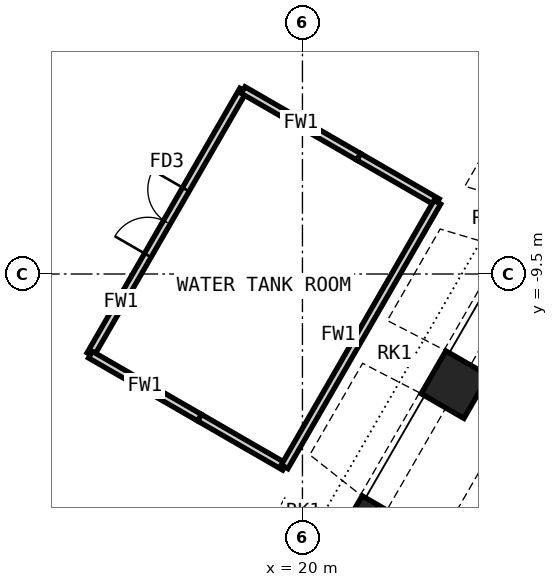
"""IFC4 building model, lengths in metres.
Left out: names, types, materials, properties, quantities, classifications, styles, units other than length and angle.
Written with IfcOpenShell. Run it as: python <this file> out.ifc"""

import sys

from ifc_helpers import new_model, si_unit, direction, frame, frame_2d, origin, origin_2d, place, context, subcontext, project, spatial, rectangle, hollow_rectangle, extrude, clip, halfspace, element, fill, save


model = new_model("IFC4")
c1 = context("Model", 3, precision=1e-05, world=origin(), true_north=direction((0.0, 1.0)))
c2 = subcontext(c1, "Body", "Model", "MODEL_VIEW")
j1 = project(units=[si_unit("LENGTHUNIT", "METRE"), si_unit("PLANEANGLEUNIT", "RADIAN")], contexts=[c1])
p1 = place(None, origin())
s1 = spatial("IfcSite", under=j1, at=p1, CompositionType="ELEMENT")
p2 = place(p1, origin())
s2 = spatial("IfcBuilding", under=s1, at=p2, CompositionType="ELEMENT")
p3 = place(p2, frame((0.0, 0.0, 97.0)))
s3 = spatial("IfcBuildingStorey", under=s2, at=p3, CompositionType="ELEMENT", Elevation=97.0)
p4 = place(p3, frame((26.214, -8.596, 0.0), z_axis=(-0.310821675411, 0.092303452339, 0.945975665005), x_axis=(0.643002166591, -0.712531180262, 0.280798025126)))
e1 = element("IfcColumn", 1, at=p4, inside=s3, PredefinedType="COLUMN", context=c2, shape_type="Clipping", body=[
    clip(clip(extrude(hollow_rectangle(XDim=1.3, YDim=1.3, WallThickness=0.1, at=origin_2d()), origin(), (0.0, 0.0, 1.0), 6.343), halfspace(frame((0.0, 0.0, 0.243), z_axis=(0.0, 0.0, -1.0), x_axis=(0.0, -1.0, 0.0)), False)), halfspace(frame((0.0, 0.0, 6.1), z_axis=(0.0, 0.0, 1.0), x_axis=(0.0, 1.0, 0.0)), False)),
])
p5 = place(p3, frame((24.011, -12.411, 0.0), z_axis=(-0.281185331584, 0.145359500171, 0.948580742484), x_axis=(0.500142058004, -0.821408540602, 0.27412758205)))
e2 = element("IfcColumn", 2, at=p5, inside=s3, PredefinedType="COLUMN", context=c2, shape_type="Clipping", body=[
    clip(clip(extrude(hollow_rectangle(XDim=1.3, YDim=1.3, WallThickness=0.1, at=origin_2d()), origin(), (0.0, 0.0, 1.0), 6.325), halfspace(frame((0.0, 0.0, 0.211), z_axis=(0.0, 0.0, -1.0), x_axis=(0.0, -1.0, 0.0)), False)), halfspace(frame((0.0, 0.0, 6.114), z_axis=(0.0, 0.0, 1.0), x_axis=(0.0, 1.0, 0.0)), False)),
])
p6 = place(p3, frame((21.809, -16.225, 0.0), z_axis=(-0.250490721891, 0.19793240078, 0.947669332081), x_axis=(0.33394448632, -0.901132039316, 0.276481695188)))
e3 = element("IfcColumn", 3, at=p6, inside=s3, PredefinedType="COLUMN", context=c2, shape_type="Clipping", body=[
    clip(clip(extrude(hollow_rectangle(XDim=1.3, YDim=1.3, WallThickness=0.1, at=origin_2d()), origin(), (0.0, 0.0, 1.0), 6.331), halfspace(frame((0.0, 0.0, 0.218), z_axis=(0.0, 0.0, -1.0), x_axis=(0.0, -1.0, 0.0)), False)), halfspace(frame((0.0, 0.0, 6.114), z_axis=(0.0, 0.0, 1.0), x_axis=(0.0, 1.0, 0.0)), False)),
])
p7 = place(p3, frame((23.55, -7.611, 0.0), z_axis=(0.0, 0.0, 1.0), x_axis=(-0.866029160995, 0.499993492265, 0.0)))
e4 = element("IfcWall", 4, at=p7, inside=s3, PredefinedType="PARTITIONING", context=c2, shape_type="SweptSolid", body=[
    extrude(rectangle(XDim=2.391, YDim=0.2, at=frame_2d((1.196, 0.0))), origin(), (0.0, 0.0, 1.0), 4.73),
])
p8 = place(p3, frame((19.531, -14.572, 0.0), z_axis=(0.0, 0.0, 1.0), x_axis=(-0.866033117094, 0.499986639918, 0.0)))
e5 = element("IfcWall", 5, at=p8, inside=s3, PredefinedType="PARTITIONING", context=c2, shape_type="SweptSolid", body=[
    extrude(rectangle(XDim=2.586, YDim=0.2, at=frame_2d((1.293, 0.0))), origin(), (0.0, 0.0, 1.0), 4.93),
])
p9 = place(p3, frame((18.44, -4.661, 0.0), z_axis=(0.0, 0.0, 1.0), x_axis=(-0.500000268222, -0.866025248926, 0.0)))
e6 = element("IfcWall", 6, at=p9, inside=s3, PredefinedType="PARTITIONING", context=c2, shape_type="SweptSolid", body=[
    extrude(rectangle(XDim=8.038, YDim=0.2, at=frame_2d((4.019, 0.0))), origin(), (0.0, 0.0, 1.0), 5.83),
])
p10 = place(p9, frame((3.019, 0.0, 0.0)))
e7 = element("IfcOpeningElement", 7, at=p10, cuts=e6, PredefinedType="OPENING", context=c2, shape_type="SweptSolid", body=[
    extrude(rectangle(XDim=2.0, YDim=2.4, at=frame_2d((1.0, 1.2))), frame((0.0, 0.11, 0.0), z_axis=(0.0, -1.0, 0.0), x_axis=(1.0, 0.0, 0.0)), (0.0, 0.0, 1.0), 0.22),
])
p11 = place(p3, frame((23.55, -7.611, 0.0), z_axis=(0.0, 0.0, 1.0), x_axis=(-0.500000268222, -0.866025248926, 0.0)))
e8 = element("IfcWall", 8, at=p11, inside=s3, PredefinedType="PARTITIONING", context=c2, shape_type="SweptSolid", body=[
    extrude(rectangle(XDim=8.038, YDim=0.2, at=frame_2d((4.019, 0.0))), origin(), (0.0, 0.0, 1.0), 5.83),
])
p12 = place(p3, frame((21.479, -6.415, 0.0), z_axis=(0.0, 0.0, 1.0), x_axis=(-0.866033803376, 0.499985451198, 0.0)))
e9 = element("IfcWall", 9, at=p12, inside=s3, PredefinedType="PARTITIONING", context=c2, shape_type="SweptSolid", body=[
    extrude(rectangle(XDim=3.509, YDim=0.2, at=frame_2d((1.754, 0.0))), origin(), (0.0, 0.0, 1.0), 5.83),
])
p13 = place(p3, frame((17.291, -13.279, 0.0), z_axis=(0.0, 0.0, 1.0), x_axis=(-0.866030989016, 0.499990325971, 0.0)))
e10 = element("IfcWall", 10, at=p13, inside=s3, PredefinedType="PARTITIONING", context=c2, shape_type="SweptSolid", body=[
    extrude(rectangle(XDim=3.313, YDim=0.2, at=frame_2d((1.657, 0.0))), origin(), (0.0, 0.0, 1.0), 5.83),
])
p14 = place(p10, origin())
e11 = element("IfcDoor", 11, at=p14, inside=s3, OperationType="DOUBLE_DOOR_DOUBLE_SWING", PredefinedType="DOOR", context=c2, shape_type="SweptSolid", body=[
    extrude(rectangle(XDim=2.0, YDim=2.4, at=frame_2d((1.0, 1.2))), frame((0.0, 0.025, 0.0), z_axis=(0.0, -1.0, 0.0), x_axis=(1.0, 0.0, 0.0)), (0.0, 0.0, 1.0), 0.05),
])
fill(e7, e11)
save(model, sys.argv[1])
